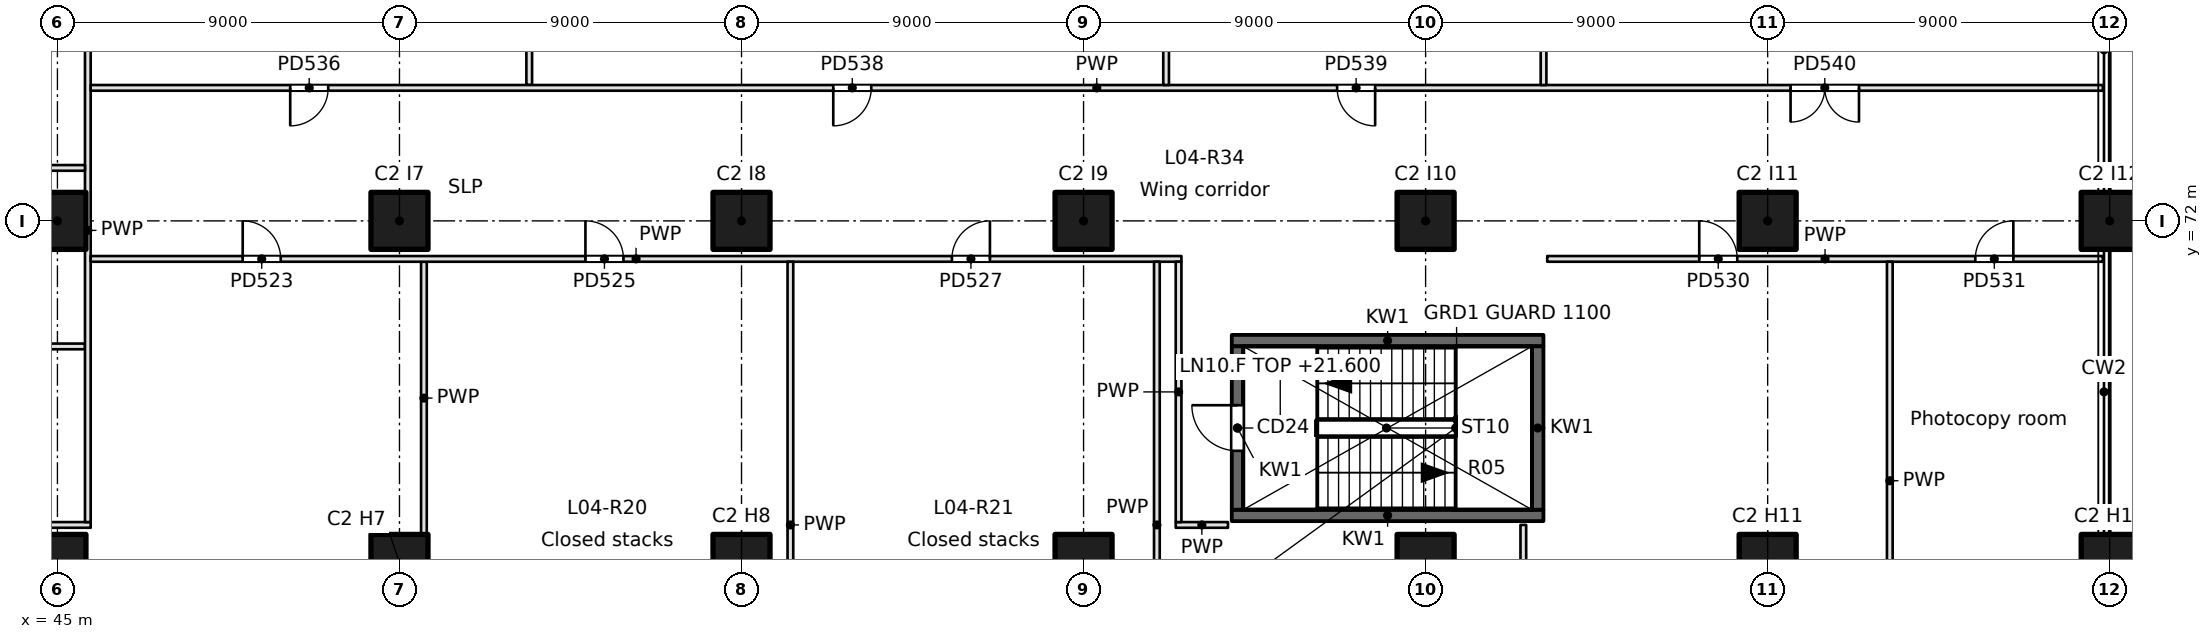
"""IFC4 building model, lengths in metres.
Left out: names, types, materials, properties, quantities, classifications, styles, units other than length and angle.
Written with IfcOpenShell. Run it as: python <this file> out.ifc"""

import sys

from ifc_helpers import new_model, si_unit, direction, frame, frame_2d, origin, origin_2d, place, context, subcontext, project, spatial, rectangle, extrude, element, fill, save


model = new_model("IFC4")
c1 = context("Model", 3, precision=1e-05, world=origin(), true_north=direction((0.0, 1.0)))
c2 = subcontext(c1, "Body", "Model", "MODEL_VIEW")
j1 = project(units=[si_unit("LENGTHUNIT", "METRE"), si_unit("PLANEANGLEUNIT", "RADIAN")], contexts=[c1])
p1 = place(None, origin())
s1 = spatial("IfcSite", under=j1, at=p1, CompositionType="ELEMENT")
p2 = place(p1, origin())
s2 = spatial("IfcBuilding", under=s1, at=p2, CompositionType="ELEMENT")
p3 = place(p2, frame((0.0, 0.0, 21.6)))
s3 = spatial("IfcBuildingStorey", under=s2, at=p3, CompositionType="ELEMENT", Elevation=21.6)
for number, where, z_axis, x_axis in (
    (1, (99.0, 63.0, 0.0), (0.0, 0.0, 1.0), (1.0, 0.0, 0.0)),
    (2, (99.0, 72.0, 0.0), (0.0, 0.0, 1.0), (1.0, 0.0, 0.0)),
    (3, (45.0, 63.0, 0.0), (0.0, 0.0, 1.0), (1.0, 0.0, 0.0)),
    (4, (45.0, 72.0, 0.0), (0.0, 0.0, 1.0), (1.0, 0.0, 0.0)),
    (5, (54.0, 63.0, 0.0), (0.0, 0.0, 1.0), (1.0, 0.0, 0.0)),
    (6, (54.0, 72.0, 0.0), (0.0, 0.0, 1.0), (1.0, 0.0, 0.0)),
    (7, (63.0, 63.0, 0.0), (0.0, 0.0, 1.0), (1.0, 0.0, 0.0)),
    (8, (63.0, 72.0, 0.0), (0.0, 0.0, 1.0), (1.0, 0.0, 0.0)),
    (9, (72.0, 63.0, 0.0), (0.0, 0.0, 1.0), (1.0, 0.0, 0.0)),
    (10, (72.0, 72.0, 0.0), (0.0, 0.0, 1.0), (1.0, 0.0, 0.0)),
    (11, (81.0, 63.0, 0.0), (0.0, 0.0, 1.0), (1.0, 0.0, 0.0)),
    (12, (81.0, 72.0, 0.0), (0.0, 0.0, 1.0), (1.0, 0.0, 0.0)),
    (13, (90.0, 63.0, 0.0), (0.0, 0.0, 1.0), (1.0, 0.0, 0.0)),
    (14, (90.0, 72.0, 0.0), (0.0, 0.0, 1.0), (1.0, 0.0, 0.0)),
):
    element("IfcColumn", number, at=place(p3, frame(where, z_axis=z_axis, x_axis=x_axis)), inside=s3, PredefinedType="COLUMN", context=c2, shape_type="SweptSolid", body=[
        extrude(rectangle(XDim=1.5, YDim=1.5, at=origin_2d()), origin(), (0.0, 0.0, 1.0), 4.8),
    ])
for number, where, z_axis, x_axis in (
    (15, (75.9, 64.25, -0.35), (0.0, 0.0, 1.0), (1.0, 0.0, 0.0)),
    (16, (75.9, 68.85, -0.35), (0.0, 0.0, 1.0), (1.0, 0.0, 0.0)),
):
    element("IfcWall", number, at=place(p3, frame(where, z_axis=z_axis, x_axis=x_axis)), inside=s3, PredefinedType="SOLIDWALL", context=c2, shape_type="SweptSolid", body=[
        extrude(rectangle(XDim=8.2, YDim=0.3, at=frame_2d((4.1, 0.0))), origin(), (0.0, 0.0, 1.0), 4.8),
    ])
p4 = place(p3, frame((76.05, 64.4, -0.35), z_axis=(0.0, 0.0, 1.0), x_axis=(0.0, 1.0, 0.0)))
e17 = element("IfcWall", 17, at=p4, inside=s3, PredefinedType="SOLIDWALL", context=c2, shape_type="SweptSolid", body=[
    extrude(rectangle(XDim=4.3, YDim=0.3, at=frame_2d((2.15, 0.0))), origin(), (0.0, 0.0, 1.0), 4.8),
])
p5 = place(p4, frame((1.55, 0.0, 0.35)))
e18 = element("IfcOpeningElement", 18, at=p5, cuts=e17, PredefinedType="OPENING", context=c2, shape_type="SweptSolid", body=[
    extrude(rectangle(XDim=1.2, YDim=2.1, at=frame_2d((0.6, 1.05))), frame((0.0, 0.15, 0.0), z_axis=(0.0, -1.0, 0.0), x_axis=(1.0, 0.0, 0.0)), (0.0, 0.0, 1.0), 0.3),
])
p6 = place(p3, frame((83.95, 64.4, -0.35), z_axis=(0.0, 0.0, 1.0), x_axis=(0.0, 1.0, 0.0)))
e19 = element("IfcWall", 19, at=p6, inside=s3, PredefinedType="SOLIDWALL", context=c2, shape_type="SweptSolid", body=[
    extrude(rectangle(XDim=4.3, YDim=0.3, at=frame_2d((2.15, 0.0))), origin(), (0.0, 0.0, 1.0), 4.8),
])
p7 = place(p3, frame((40.575, 68.697, 0.0), z_axis=(0.0, 0.0, 1.0), x_axis=(1.0, 0.0, 0.0)))
e20 = element("IfcWall", 20, at=p7, inside=s3, PredefinedType="PARTITIONING", context=c2, shape_type="SweptSolid", body=[
    extrude(rectangle(XDim=5.15, YDim=0.15, at=frame_2d((2.575, 0.0))), origin(), (0.0, 0.0, 1.0), 4.45),
])
p8 = place(p3, frame((45.875, 64.0, 0.0), z_axis=(0.0, 0.0, 1.0), x_axis=(-1.0, 0.0, 0.0)))
e21 = element("IfcWall", 21, at=p8, inside=s3, PredefinedType="PARTITIONING", context=c2, shape_type="SweptSolid", body=[
    extrude(rectangle(XDim=5.45, YDim=0.15, at=frame_2d((2.725, 0.0))), origin(), (0.0, 0.0, 1.0), 4.45),
])
p9 = place(p3, frame((74.425, 64.0, 0.0), z_axis=(0.0, 0.0, 1.0), x_axis=(1.0, 0.0, 0.0)))
e22 = element("IfcWall", 22, at=p9, inside=s3, PredefinedType="PARTITIONING", context=c2, shape_type="SweptSolid", body=[
    extrude(rectangle(XDim=1.375, YDim=0.15, at=frame_2d((0.688, 0.0))), origin(), (0.0, 0.0, 1.0), 4.45),
])
p10 = place(p3, frame((45.8, 79.425, 0.0), z_axis=(0.0, 0.0, 1.0), x_axis=(0.0, -1.0, 0.0)))
e23 = element("IfcWall", 23, at=p10, inside=s3, PredefinedType="PARTITIONING", context=c2, shape_type="SweptSolid", body=[
    extrude(rectangle(XDim=15.35, YDim=0.15, at=frame_2d((7.675, 0.0))), origin(), (0.0, 0.0, 1.0), 4.45),
])
p11 = place(p3, frame((40.575, 73.394, 0.0), z_axis=(0.0, 0.0, 1.0), x_axis=(1.0, 0.0, 0.0)))
e24 = element("IfcWall", 24, at=p11, inside=s3, PredefinedType="PARTITIONING", context=c2, shape_type="SweptSolid", body=[
    extrude(rectangle(XDim=5.15, YDim=0.15, at=frame_2d((2.575, 0.0))), origin(), (0.0, 0.0, 1.0), 4.45),
])
p12 = place(p3, frame((54.643, 63.75, 0.0), z_axis=(0.0, 0.0, 1.0), x_axis=(0.0, 1.0, 0.0)))
e25 = element("IfcWall", 25, at=p12, inside=s3, PredefinedType="PARTITIONING", context=c2, shape_type="SweptSolid", body=[
    extrude(rectangle(XDim=7.175, YDim=0.15, at=frame_2d((3.587, 0.0))), origin(), (0.0, 0.0, 1.0), 4.45),
])
p13 = place(p3, frame((45.875, 71.0, 0.0), z_axis=(0.0, 0.0, 1.0), x_axis=(1.0, 0.0, 0.0)))
e26 = element("IfcWall", 26, at=p13, inside=s3, PredefinedType="PARTITIONING", context=c2, shape_type="SweptSolid", body=[
    extrude(rectangle(XDim=28.7, YDim=0.15, at=frame_2d((14.35, 0.0))), origin(), (0.0, 0.0, 1.0), 4.45),
])
p14 = place(p13, frame((4.0, 0.0, 0.0)))
e27 = element("IfcOpeningElement", 27, at=p14, cuts=e26, PredefinedType="OPENING", context=c2, shape_type="SweptSolid", body=[
    extrude(rectangle(XDim=1.0, YDim=2.1, at=frame_2d((0.5, 1.05))), frame((0.0, 0.075, 0.0), z_axis=(0.0, -1.0, 0.0), x_axis=(1.0, 0.0, 0.0)), (0.0, 0.0, 1.0), 0.15),
])
p15 = place(p13, frame((13.018, 0.0, 0.0)))
e28 = element("IfcOpeningElement", 28, at=p15, cuts=e26, PredefinedType="OPENING", context=c2, shape_type="SweptSolid", body=[
    extrude(rectangle(XDim=1.0, YDim=2.1, at=frame_2d((0.5, 1.05))), frame((0.0, 0.075, 0.0), z_axis=(0.0, -1.0, 0.0), x_axis=(1.0, 0.0, 0.0)), (0.0, 0.0, 1.0), 0.15),
])
p16 = place(p13, frame((22.661, 0.0, 0.0)))
e29 = element("IfcOpeningElement", 29, at=p16, cuts=e26, PredefinedType="OPENING", context=c2, shape_type="SweptSolid", body=[
    extrude(rectangle(XDim=1.0, YDim=2.1, at=frame_2d((0.5, 1.05))), frame((0.0, 0.075, 0.0), z_axis=(0.0, -1.0, 0.0), x_axis=(1.0, 0.0, 0.0)), (0.0, 0.0, 1.0), 0.15),
])
p17 = place(p3, frame((84.2, 71.0, 0.0), z_axis=(0.0, 0.0, 1.0), x_axis=(1.0, 0.0, 0.0)))
e30 = element("IfcWall", 30, at=p17, inside=s3, PredefinedType="PARTITIONING", context=c2, shape_type="SweptSolid", body=[
    extrude(rectangle(XDim=14.62, YDim=0.15, at=frame_2d((7.31, 0.0))), origin(), (0.0, 0.0, 1.0), 4.45),
])
p18 = place(p17, frame((4.0, 0.0, 0.0)))
e31 = element("IfcOpeningElement", 31, at=p18, cuts=e30, PredefinedType="OPENING", context=c2, shape_type="SweptSolid", body=[
    extrude(rectangle(XDim=1.0, YDim=2.1, at=frame_2d((0.5, 1.05))), frame((0.0, 0.075, 0.0), z_axis=(0.0, -1.0, 0.0), x_axis=(1.0, 0.0, 0.0)), (0.0, 0.0, 1.0), 0.15),
])
p19 = place(p17, frame((11.264, 0.0, 0.0)))
e32 = element("IfcOpeningElement", 32, at=p19, cuts=e30, PredefinedType="OPENING", context=c2, shape_type="SweptSolid", body=[
    extrude(rectangle(XDim=1.0, YDim=2.1, at=frame_2d((0.5, 1.05))), frame((0.0, 0.075, 0.0), z_axis=(0.0, -1.0, 0.0), x_axis=(1.0, 0.0, 0.0)), (0.0, 0.0, 1.0), 0.15),
])
for number, where, z_axis, x_axis in (
    (33, (64.286, 57.075, 0.0), (0.0, 0.0, 1.0), (0.0, 1.0, 0.0)),
    (34, (73.929, 57.075, 0.0), (0.0, 0.0, 1.0), (0.0, 1.0, 0.0)),
):
    element("IfcWall", number, at=place(p3, frame(where, z_axis=z_axis, x_axis=x_axis)), inside=s3, PredefinedType="PARTITIONING", context=c2, shape_type="SweptSolid", body=[
        extrude(rectangle(XDim=13.85, YDim=0.15, at=frame_2d((6.925, 0.0))), origin(), (0.0, 0.0, 1.0), 4.45),
    ])
p20 = place(p3, frame((83.571, 57.075, 0.0), z_axis=(0.0, 0.0, 1.0), x_axis=(0.0, 1.0, 0.0)))
e35 = element("IfcWall", 35, at=p20, inside=s3, PredefinedType="PARTITIONING", context=c2, shape_type="SweptSolid", body=[
    extrude(rectangle(XDim=6.925, YDim=0.15, at=frame_2d((3.462, 0.0))), origin(), (0.0, 0.0, 1.0), 4.45),
])
p21 = place(p3, frame((74.5, 70.925, 0.0), z_axis=(0.0, 0.0, 1.0), x_axis=(0.0, -1.0, 0.0)))
e36 = element("IfcWall", 36, at=p21, inside=s3, PredefinedType="PARTITIONING", context=c2, shape_type="SweptSolid", body=[
    extrude(rectangle(XDim=6.85, YDim=0.15, at=frame_2d((3.425, 0.0))), origin(), (0.0, 0.0, 1.0), 4.45),
])
p22 = place(p3, frame((93.214, 59.4, 0.0), z_axis=(0.0, 0.0, 1.0), x_axis=(0.0, 1.0, 0.0)))
e37 = element("IfcWall", 37, at=p22, inside=s3, PredefinedType="PARTITIONING", context=c2, shape_type="SweptSolid", body=[
    extrude(rectangle(XDim=11.525, YDim=0.15, at=frame_2d((5.763, 0.0))), origin(), (0.0, 0.0, 1.0), 4.45),
])
p23 = place(p3, frame((57.414, 75.575, 0.0), z_axis=(0.0, 0.0, 1.0), x_axis=(0.0, 1.0, 0.0)))
e38 = element("IfcWall", 38, at=p23, inside=s3, PredefinedType="PARTITIONING", context=c2, shape_type="SweptSolid", body=[
    extrude(rectangle(XDim=17.925, YDim=0.15, at=frame_2d((8.962, 0.0))), origin(), (0.0, 0.0, 1.0), 4.45),
])
p24 = place(p3, frame((98.82, 75.5, 0.0), z_axis=(0.0, 0.0, 1.0), x_axis=(-1.0, 0.0, 0.0)))
e39 = element("IfcWall", 39, at=p24, inside=s3, PredefinedType="PARTITIONING", context=c2, shape_type="SweptSolid", body=[
    extrude(rectangle(XDim=52.945, YDim=0.15, at=frame_2d((26.473, 0.0))), origin(), (0.0, 0.0, 1.0), 4.45),
])
p25 = place(p24, frame((46.695, 0.0, 0.0)))
e40 = element("IfcOpeningElement", 40, at=p25, cuts=e39, PredefinedType="OPENING", context=c2, shape_type="SweptSolid", body=[
    extrude(rectangle(XDim=1.0, YDim=2.1, at=frame_2d((0.5, 1.05))), frame((0.0, 0.075, 0.0), z_axis=(0.0, -1.0, 0.0), x_axis=(1.0, 0.0, 0.0)), (0.0, 0.0, 1.0), 0.15),
])
p26 = place(p24, frame((32.406, 0.0, 0.0)))
e41 = element("IfcOpeningElement", 41, at=p26, cuts=e39, PredefinedType="OPENING", context=c2, shape_type="SweptSolid", body=[
    extrude(rectangle(XDim=1.0, YDim=2.1, at=frame_2d((0.5, 1.05))), frame((0.0, 0.075, 0.0), z_axis=(0.0, -1.0, 0.0), x_axis=(1.0, 0.0, 0.0)), (0.0, 0.0, 1.0), 0.15),
])
p27 = place(p24, frame((19.148, 0.0, 0.0)))
e42 = element("IfcOpeningElement", 42, at=p27, cuts=e39, PredefinedType="OPENING", context=c2, shape_type="SweptSolid", body=[
    extrude(rectangle(XDim=1.0, YDim=2.1, at=frame_2d((0.5, 1.05))), frame((0.0, 0.075, 0.0), z_axis=(0.0, -1.0, 0.0), x_axis=(1.0, 0.0, 0.0)), (0.0, 0.0, 1.0), 0.15),
])
p28 = place(p24, frame((6.417, 0.0, 0.0)))
e43 = element("IfcOpeningElement", 43, at=p28, cuts=e39, PredefinedType="OPENING", context=c2, shape_type="SweptSolid", body=[
    extrude(rectangle(XDim=1.8, YDim=2.1, at=frame_2d((0.9, 1.05))), frame((0.0, 0.075, 0.0), z_axis=(0.0, -1.0, 0.0), x_axis=(1.0, 0.0, 0.0)), (0.0, 0.0, 1.0), 0.15),
])
p29 = place(p3, frame((74.172, 75.575, 0.0), z_axis=(0.0, 0.0, 1.0), x_axis=(0.0, 1.0, 0.0)))
e44 = element("IfcWall", 44, at=p29, inside=s3, PredefinedType="PARTITIONING", context=c2, shape_type="SweptSolid", body=[
    extrude(rectangle(XDim=17.925, YDim=0.15, at=frame_2d((8.962, 0.0))), origin(), (0.0, 0.0, 1.0), 4.45),
])
p30 = place(p3, frame((84.103, 75.575, 0.0), z_axis=(0.0, 0.0, 1.0), x_axis=(0.0, 1.0, 0.0)))
e45 = element("IfcWall", 45, at=p30, inside=s3, PredefinedType="PARTITIONING", context=c2, shape_type="SweptSolid", body=[
    extrude(rectangle(XDim=22.525, YDim=0.15, at=frame_2d((11.263, 0.0))), origin(), (0.0, 0.0, 1.0), 4.45),
])
p31 = place(p5, origin())
e46 = element("IfcDoor", 46, at=p31, inside=s3, OperationType="SINGLE_SWING_RIGHT", PredefinedType="DOOR", context=c2, shape_type="SweptSolid", body=[
    extrude(rectangle(XDim=1.2, YDim=2.1, at=frame_2d((0.6, 1.05))), frame((0.0, 0.025, 0.0), z_axis=(0.0, -1.0, 0.0), x_axis=(1.0, 0.0, 0.0)), (0.0, 0.0, 1.0), 0.05),
])
fill(e18, e46)
p32 = place(p14, origin())
e47 = element("IfcDoor", 47, at=p32, inside=s3, OperationType="SINGLE_SWING_LEFT", PredefinedType="DOOR", context=c2, shape_type="SweptSolid", body=[
    extrude(rectangle(XDim=1.0, YDim=2.1, at=frame_2d((0.5, 1.05))), frame((0.0, 0.025, 0.0), z_axis=(0.0, -1.0, 0.0), x_axis=(1.0, 0.0, 0.0)), (0.0, 0.0, 1.0), 0.05),
])
fill(e27, e47)
p33 = place(p15, origin())
e48 = element("IfcDoor", 48, at=p33, inside=s3, OperationType="SINGLE_SWING_LEFT", PredefinedType="DOOR", context=c2, shape_type="SweptSolid", body=[
    extrude(rectangle(XDim=1.0, YDim=2.1, at=frame_2d((0.5, 1.05))), frame((0.0, 0.025, 0.0), z_axis=(0.0, -1.0, 0.0), x_axis=(1.0, 0.0, 0.0)), (0.0, 0.0, 1.0), 0.05),
])
fill(e28, e48)
p34 = place(p16, origin())
e49 = element("IfcDoor", 49, at=p34, inside=s3, OperationType="SINGLE_SWING_RIGHT", PredefinedType="DOOR", context=c2, shape_type="SweptSolid", body=[
    extrude(rectangle(XDim=1.0, YDim=2.1, at=frame_2d((0.5, 1.05))), frame((0.0, 0.025, 0.0), z_axis=(0.0, -1.0, 0.0), x_axis=(1.0, 0.0, 0.0)), (0.0, 0.0, 1.0), 0.05),
])
fill(e29, e49)
p35 = place(p18, origin())
e50 = element("IfcDoor", 50, at=p35, inside=s3, OperationType="SINGLE_SWING_LEFT", PredefinedType="DOOR", context=c2, shape_type="SweptSolid", body=[
    extrude(rectangle(XDim=1.0, YDim=2.1, at=frame_2d((0.5, 1.05))), frame((0.0, 0.025, 0.0), z_axis=(0.0, -1.0, 0.0), x_axis=(1.0, 0.0, 0.0)), (0.0, 0.0, 1.0), 0.05),
])
fill(e31, e50)
p36 = place(p19, origin())
e51 = element("IfcDoor", 51, at=p36, inside=s3, OperationType="SINGLE_SWING_RIGHT", PredefinedType="DOOR", context=c2, shape_type="SweptSolid", body=[
    extrude(rectangle(XDim=1.0, YDim=2.1, at=frame_2d((0.5, 1.05))), frame((0.0, 0.025, 0.0), z_axis=(0.0, -1.0, 0.0), x_axis=(1.0, 0.0, 0.0)), (0.0, 0.0, 1.0), 0.05),
])
fill(e32, e51)
p37 = place(p25, origin())
e52 = element("IfcDoor", 52, at=p37, inside=s3, OperationType="SINGLE_SWING_RIGHT", PredefinedType="DOOR", context=c2, shape_type="SweptSolid", body=[
    extrude(rectangle(XDim=1.0, YDim=2.1, at=frame_2d((0.5, 1.05))), frame((0.0, 0.025, 0.0), z_axis=(0.0, -1.0, 0.0), x_axis=(1.0, 0.0, 0.0)), (0.0, 0.0, 1.0), 0.05),
])
fill(e40, e52)
p38 = place(p26, origin())
e53 = element("IfcDoor", 53, at=p38, inside=s3, OperationType="SINGLE_SWING_RIGHT", PredefinedType="DOOR", context=c2, shape_type="SweptSolid", body=[
    extrude(rectangle(XDim=1.0, YDim=2.1, at=frame_2d((0.5, 1.05))), frame((0.0, 0.025, 0.0), z_axis=(0.0, -1.0, 0.0), x_axis=(1.0, 0.0, 0.0)), (0.0, 0.0, 1.0), 0.05),
])
fill(e41, e53)
p39 = place(p27, origin())
e54 = element("IfcDoor", 54, at=p39, inside=s3, OperationType="SINGLE_SWING_LEFT", PredefinedType="DOOR", context=c2, shape_type="SweptSolid", body=[
    extrude(rectangle(XDim=1.0, YDim=2.1, at=frame_2d((0.5, 1.05))), frame((0.0, 0.025, 0.0), z_axis=(0.0, -1.0, 0.0), x_axis=(1.0, 0.0, 0.0)), (0.0, 0.0, 1.0), 0.05),
])
fill(e42, e54)
p40 = place(p28, origin())
e55 = element("IfcDoor", 55, at=p40, inside=s3, OperationType="DOUBLE_DOOR_SINGLE_SWING", PredefinedType="DOOR", context=c2, shape_type="SweptSolid", body=[
    extrude(rectangle(XDim=1.8, YDim=2.1, at=frame_2d((0.9, 1.05))), frame((0.0, 0.025, 0.0), z_axis=(0.0, -1.0, 0.0), x_axis=(1.0, 0.0, 0.0)), (0.0, 0.0, 1.0), 0.05),
])
fill(e43, e55)
save(model, sys.argv[1])
